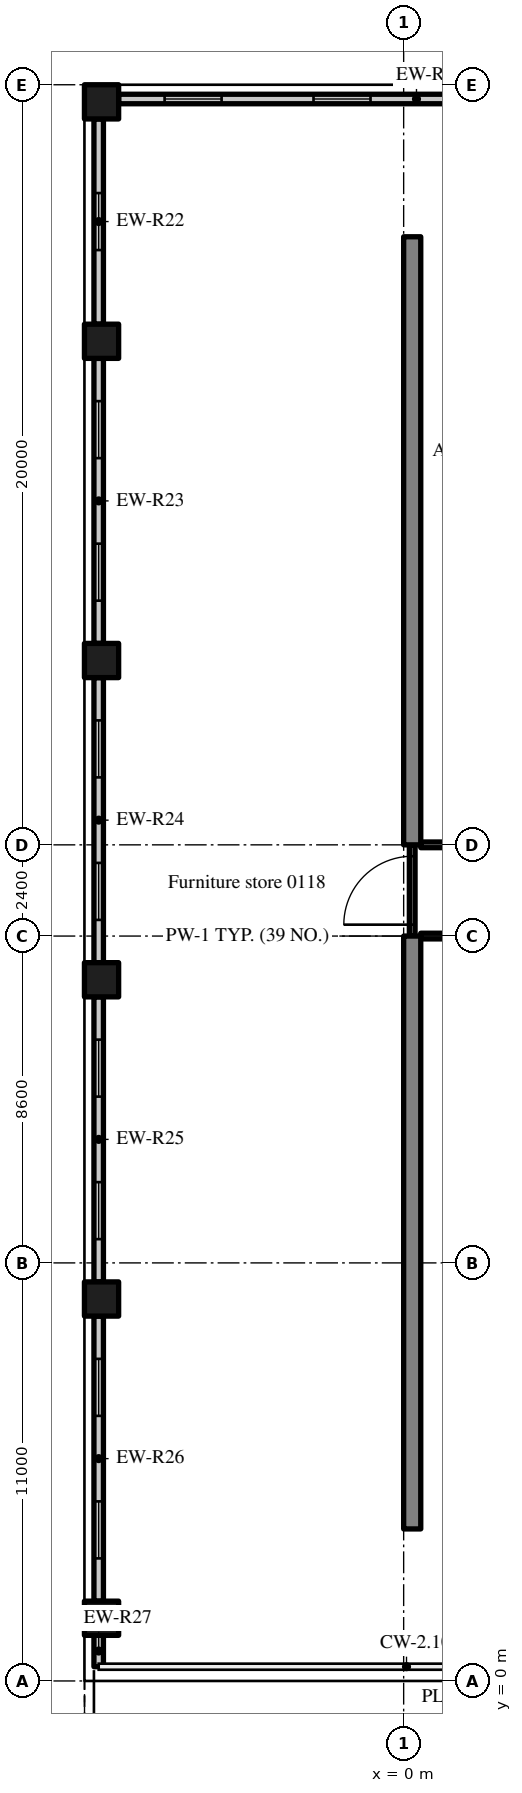
"""IFC4 building model, lengths in metres.
Left out: names, types, materials, properties, quantities, classifications, styles, units other than length and angle.
Written with IfcOpenShell. Run it as: python <this file> out.ifc"""

import sys

from ifc_helpers import new_model, si_unit, direction, frame, frame_2d, origin, origin_2d, place, context, subcontext, project, spatial, rectangle, extrude, source, transform, mapped, element, fill, save


model = new_model("IFC4")
c1 = context("Model", 3, precision=1e-05, world=origin(), true_north=direction((0.0, 1.0)))
c2 = subcontext(c1, "Body", "Model", "MODEL_VIEW")
j1 = project(units=[si_unit("LENGTHUNIT", "METRE"), si_unit("PLANEANGLEUNIT", "RADIAN")], contexts=[c1])
p1 = place(None, origin())
s1 = spatial("IfcSite", under=j1, at=p1, CompositionType="ELEMENT")
p2 = place(p1, origin())
s2 = spatial("IfcBuilding", under=s1, at=p2, CompositionType="ELEMENT")
p3 = place(p2, frame((0.0, 0.0, 6.0)))
s3 = spatial("IfcBuildingStorey", under=s2, at=p3, CompositionType="ELEMENT", Elevation=6.0)
m1 = source(origin(), c2, "Body", "SweptSolid", [
    extrude(rectangle(XDim=15.6, YDim=0.45, at=frame_2d((7.8, 0.0))), origin(), (0.0, 0.0, 1.0), 5.12),
])
p4 = place(p3, frame((0.225, 4.0, 0.0), z_axis=(0.0, 0.0, 1.0), x_axis=(0.0, 1.0, 0.0)))
e1 = element("IfcWall", 1, at=p4, inside=s3, PredefinedType="SHEAR", context=c2, shape_type="MappedRepresentation", body=[
    mapped(m1, transform((0.0, 0.0, 0.0), scale=1.0)),
])
m2 = source(origin(), c2, "Body", "SweptSolid", [
    extrude(rectangle(XDim=16.0, YDim=0.45, at=frame_2d((8.0, 0.0))), origin(), (0.0, 0.0, 1.0), 5.12),
])
p5 = place(p3, frame((0.225, 22.0, 0.0), z_axis=(0.0, 0.0, 1.0), x_axis=(0.0, 1.0, 0.0)))
e2 = element("IfcWall", 2, at=p5, inside=s3, PredefinedType="SHEAR", context=c2, shape_type="MappedRepresentation", body=[
    mapped(m2, transform((0.0, 0.0, 0.0), scale=1.0)),
])
m3 = source(origin(), c2, "Body", "SweptSolid", [
    extrude(rectangle(XDim=0.9, YDim=0.9, at=origin_2d()), origin(), (0.0, 0.0, 1.0), 5.12),
])
for number, where, z_axis, x_axis in (
    (3, (-7.95, 1.65, 0.0), (0.0, 0.0, 1.0), (1.0, 0.0, 0.0)),
    (4, (-7.95, 10.05, 0.0), (0.0, 0.0, 1.0), (1.0, 0.0, 0.0)),
    (5, (-7.95, 18.45, 0.0), (0.0, 0.0, 1.0), (1.0, 0.0, 0.0)),
    (6, (-7.95, 26.85, 0.0), (0.0, 0.0, 1.0), (1.0, 0.0, 0.0)),
    (7, (-7.95, 35.25, 0.0), (0.0, 0.0, 1.0), (1.0, 0.0, 0.0)),
    (8, (-7.95, 41.55, 0.0), (0.0, 0.0, 1.0), (1.0, 0.0, 0.0)),
):
    element("IfcColumn", number, at=place(p3, frame(where, z_axis=z_axis, x_axis=x_axis)), inside=s3, PredefinedType="COLUMN", context=c2, shape_type="MappedRepresentation", body=[
        mapped(m3, transform((0.0, 0.0, 0.0), scale=1.0)),
    ])
m4 = source(origin(), c2, "Body", "SweptSolid", [
    extrude(rectangle(XDim=15.675, YDim=0.25, at=frame_2d((7.837, 0.0))), origin(), (0.0, 0.0, 1.0), 4.37),
])
p6 = place(p3, frame((8.175, 41.625, 0.0), z_axis=(0.0, 0.0, 1.0), x_axis=(-1.0, 0.0, 0.0)))
e9 = element("IfcWall", 9, at=p6, inside=s3, PredefinedType="SOLIDWALL", context=c2, shape_type="MappedRepresentation", body=[
    mapped(m4, transform((0.0, 0.0, 0.0), scale=1.0)),
])
m5 = source(origin(), c2, "Body", "SweptSolid", [
    extrude(rectangle(XDim=1.5, YDim=1.5, at=frame_2d((0.75, 0.75))), frame((0.0, 0.135, 0.0), z_axis=(0.0, -1.0, 0.0), x_axis=(1.0, 0.0, 0.0)), (0.0, 0.0, 1.0), 0.27),
])
p7 = place(p6, frame((1.209, 0.0, 0.9)))
e10 = element("IfcOpeningElement", 10, at=p7, cuts=e9, PredefinedType="OPENING", context=c2, shape_type="MappedRepresentation", body=[
    mapped(m5, transform((0.0, 0.0, 0.0), scale=1.0)),
])
p8 = place(p6, frame((5.128, 0.0, 0.9)))
e11 = element("IfcOpeningElement", 11, at=p8, cuts=e9, PredefinedType="OPENING", context=c2, shape_type="MappedRepresentation", body=[
    mapped(m5, transform((0.0, 0.0, 0.0), scale=1.0)),
])
p9 = place(p6, frame((9.047, 0.0, 0.9)))
e12 = element("IfcOpeningElement", 12, at=p9, cuts=e9, PredefinedType="OPENING", context=c2, shape_type="MappedRepresentation", body=[
    mapped(m5, transform((0.0, 0.0, 0.0), scale=1.0)),
])
p10 = place(p6, frame((12.966, 0.0, 0.9)))
e13 = element("IfcOpeningElement", 13, at=p10, cuts=e9, PredefinedType="OPENING", context=c2, shape_type="MappedRepresentation", body=[
    mapped(m5, transform((0.0, 0.0, 0.0), scale=1.0)),
])
m6 = source(origin(), c2, "Body", "SweptSolid", [
    extrude(rectangle(XDim=5.4, YDim=0.25, at=frame_2d((2.7, 0.0))), origin(), (0.0, 0.0, 1.0), 4.12),
])
p11 = place(p3, frame((-8.025, 41.1, 0.0), z_axis=(0.0, 0.0, 1.0), x_axis=(0.0, -1.0, 0.0)))
e14 = element("IfcWall", 14, at=p11, inside=s3, PredefinedType="SOLIDWALL", context=c2, shape_type="MappedRepresentation", body=[
    mapped(m6, transform((0.0, 0.0, 0.0), scale=1.0)),
])
m7 = source(origin(), c2, "Body", "SweptSolid", [
    extrude(rectangle(XDim=1.5, YDim=2.0, at=frame_2d((0.75, 1.0))), frame((0.0, 0.135, 0.0), z_axis=(0.0, -1.0, 0.0), x_axis=(1.0, 0.0, 0.0)), (0.0, 0.0, 1.0), 0.27),
])
p12 = place(p11, frame((1.95, 0.0, 0.9)))
e15 = element("IfcOpeningElement", 15, at=p12, cuts=e14, PredefinedType="OPENING", context=c2, shape_type="MappedRepresentation", body=[
    mapped(m7, transform((0.0, 0.0, 0.0), scale=1.0)),
])
m8 = source(origin(), c2, "Body", "SweptSolid", [
    extrude(rectangle(XDim=7.5, YDim=0.25, at=frame_2d((3.75, 0.0))), origin(), (0.0, 0.0, 1.0), 4.12),
])
p13 = place(p3, frame((-8.025, 34.8, 0.0), z_axis=(0.0, 0.0, 1.0), x_axis=(0.0, -1.0, 0.0)))
e16 = element("IfcWall", 16, at=p13, inside=s3, PredefinedType="SOLIDWALL", context=c2, shape_type="MappedRepresentation", body=[
    mapped(m8, transform((0.0, 0.0, 0.0), scale=1.0)),
])
p14 = place(p13, frame((1.125, 0.0, 0.9)))
e17 = element("IfcOpeningElement", 17, at=p14, cuts=e16, PredefinedType="OPENING", context=c2, shape_type="MappedRepresentation", body=[
    mapped(m7, transform((0.0, 0.0, 0.0), scale=1.0)),
])
p15 = place(p13, frame((4.875, 0.0, 0.9)))
e18 = element("IfcOpeningElement", 18, at=p15, cuts=e16, PredefinedType="OPENING", context=c2, shape_type="MappedRepresentation", body=[
    mapped(m7, transform((0.0, 0.0, 0.0), scale=1.0)),
])
p16 = place(p3, frame((-8.025, 26.4, 0.0), z_axis=(0.0, 0.0, 1.0), x_axis=(0.0, -1.0, 0.0)))
e19 = element("IfcWall", 19, at=p16, inside=s3, PredefinedType="SOLIDWALL", context=c2, shape_type="MappedRepresentation", body=[
    mapped(m8, transform((0.0, 0.0, 0.0), scale=1.0)),
])
p17 = place(p16, frame((1.125, 0.0, 0.9)))
e20 = element("IfcOpeningElement", 20, at=p17, cuts=e19, PredefinedType="OPENING", context=c2, shape_type="MappedRepresentation", body=[
    mapped(m7, transform((0.0, 0.0, 0.0), scale=1.0)),
])
p18 = place(p16, frame((4.875, 0.0, 0.9)))
e21 = element("IfcOpeningElement", 21, at=p18, cuts=e19, PredefinedType="OPENING", context=c2, shape_type="MappedRepresentation", body=[
    mapped(m7, transform((0.0, 0.0, 0.0), scale=1.0)),
])
p19 = place(p3, frame((-8.025, 18.0, 0.0), z_axis=(0.0, 0.0, 1.0), x_axis=(0.0, -1.0, 0.0)))
e22 = element("IfcWall", 22, at=p19, inside=s3, PredefinedType="SOLIDWALL", context=c2, shape_type="MappedRepresentation", body=[
    mapped(m8, transform((0.0, 0.0, 0.0), scale=1.0)),
])
p20 = place(p19, frame((1.125, 0.0, 0.9)))
e23 = element("IfcOpeningElement", 23, at=p20, cuts=e22, PredefinedType="OPENING", context=c2, shape_type="MappedRepresentation", body=[
    mapped(m7, transform((0.0, 0.0, 0.0), scale=1.0)),
])
p21 = place(p19, frame((4.875, 0.0, 0.9)))
e24 = element("IfcOpeningElement", 24, at=p21, cuts=e22, PredefinedType="OPENING", context=c2, shape_type="MappedRepresentation", body=[
    mapped(m7, transform((0.0, 0.0, 0.0), scale=1.0)),
])
p22 = place(p3, frame((-8.025, 9.6, 0.0), z_axis=(0.0, 0.0, 1.0), x_axis=(0.0, -1.0, 0.0)))
e25 = element("IfcWall", 25, at=p22, inside=s3, PredefinedType="SOLIDWALL", context=c2, shape_type="MappedRepresentation", body=[
    mapped(m8, transform((0.0, 0.0, 0.0), scale=1.0)),
])
p23 = place(p22, frame((1.125, 0.0, 0.9)))
e26 = element("IfcOpeningElement", 26, at=p23, cuts=e25, PredefinedType="OPENING", context=c2, shape_type="MappedRepresentation", body=[
    mapped(m7, transform((0.0, 0.0, 0.0), scale=1.0)),
])
p24 = place(p22, frame((4.875, 0.0, 0.9)))
e27 = element("IfcOpeningElement", 27, at=p24, cuts=e25, PredefinedType="OPENING", context=c2, shape_type="MappedRepresentation", body=[
    mapped(m7, transform((0.0, 0.0, 0.0), scale=1.0)),
])
m9 = source(origin(), c2, "Body", "SweptSolid", [
    extrude(rectangle(XDim=0.825, YDim=0.25, at=frame_2d((0.413, 0.0))), origin(), (0.0, 0.0, 1.0), 4.12),
])
p25 = place(p3, frame((-8.025, 1.2, 0.0), z_axis=(0.0, 0.0, 1.0), x_axis=(0.0, -1.0, 0.0)))
e28 = element("IfcWall", 28, at=p25, inside=s3, PredefinedType="SOLIDWALL", context=c2, shape_type="MappedRepresentation", body=[
    mapped(m9, transform((0.0, 0.0, 0.0), scale=1.0)),
])
m10 = source(origin(), c2, "Body", "SweptSolid", [
    extrude(rectangle(XDim=3.675, YDim=0.15, at=frame_2d((1.837, 0.0))), origin(), (0.0, 0.0, 1.0), 4.42),
])
p26 = place(p3, frame((0.45, 19.6, 0.0), z_axis=(0.0, 0.0, 1.0), x_axis=(1.0, 0.0, 0.0)))
e29 = element("IfcWall", 29, at=p26, inside=s3, PredefinedType="PARTITIONING", context=c2, shape_type="MappedRepresentation", body=[
    mapped(m10, transform((0.0, 0.0, 0.0), scale=1.0)),
])
m11 = source(origin(), c2, "Body", "SweptSolid", [
    extrude(rectangle(XDim=1.0, YDim=2.1, at=frame_2d((0.5, 1.05))), frame((0.0, 0.085, 0.0), z_axis=(0.0, -1.0, 0.0), x_axis=(1.0, 0.0, 0.0)), (0.0, 0.0, 1.0), 0.17),
])
p27 = place(p26, frame((1.338, 0.0, 0.0)))
e30 = element("IfcOpeningElement", 30, at=p27, cuts=e29, PredefinedType="OPENING", context=c2, shape_type="MappedRepresentation", body=[
    mapped(m11, transform((0.0, 0.0, 0.0), scale=1.0)),
])
m12 = source(origin(), c2, "Body", "SweptSolid", [
    extrude(rectangle(XDim=2.4, YDim=0.15, at=frame_2d((1.2, 0.0))), origin(), (0.0, 0.0, 1.0), 4.22),
])
p28 = place(p3, frame((0.225, 19.6, 0.0), z_axis=(0.0, 0.0, 1.0), x_axis=(0.0, 1.0, 0.0)))
e31 = element("IfcWall", 31, at=p28, inside=s3, PredefinedType="PARTITIONING", context=c2, shape_type="MappedRepresentation", body=[
    mapped(m12, transform((0.0, 0.0, 0.0), scale=1.0)),
])
m13 = source(origin(), c2, "Body", "SweptSolid", [
    extrude(rectangle(XDim=1.8, YDim=2.1, at=frame_2d((0.9, 1.05))), frame((0.0, 0.085, 0.0), z_axis=(0.0, -1.0, 0.0), x_axis=(1.0, 0.0, 0.0)), (0.0, 0.0, 1.0), 0.17),
])
p29 = place(p28, frame((0.3, 0.0, 0.0)))
e32 = element("IfcOpeningElement", 32, at=p29, cuts=e31, PredefinedType="OPENING", context=c2, shape_type="MappedRepresentation", body=[
    mapped(m13, transform((0.0, 0.0, 0.0), scale=1.0)),
])
p30 = place(p3, frame((0.45, 22.0, 0.0), z_axis=(0.0, 0.0, 1.0), x_axis=(1.0, 0.0, 0.0)))
e33 = element("IfcWall", 33, at=p30, inside=s3, PredefinedType="PARTITIONING", context=c2, shape_type="MappedRepresentation", body=[
    mapped(m10, transform((0.0, 0.0, 0.0), scale=1.0)),
])
p31 = place(p30, frame((1.338, 0.0, 0.0)))
e34 = element("IfcOpeningElement", 34, at=p31, cuts=e33, PredefinedType="OPENING", context=c2, shape_type="MappedRepresentation", body=[
    mapped(m11, transform((0.0, 0.0, 0.0), scale=1.0)),
])
m14 = source(origin(), c2, "Body", "SweptSolid", [
    extrude(rectangle(XDim=1.5, YDim=1.5, at=frame_2d((0.75, 0.75))), frame((0.0, 0.03, 0.0), z_axis=(0.0, -1.0, 0.0), x_axis=(1.0, 0.0, 0.0)), (0.0, 0.0, 1.0), 0.06),
])
p32 = place(p9, origin())
e35 = element("IfcWindow", 35, at=p32, inside=s3, PartitioningType="SINGLE_PANEL", PredefinedType="WINDOW", context=c2, shape_type="MappedRepresentation", body=[
    mapped(m14, transform((0.0, 0.0, 0.0), scale=1.0)),
])
fill(e12, e35)
p33 = place(p10, origin())
e36 = element("IfcWindow", 36, at=p33, inside=s3, PartitioningType="SINGLE_PANEL", PredefinedType="WINDOW", context=c2, shape_type="MappedRepresentation", body=[
    mapped(m14, transform((0.0, 0.0, 0.0), scale=1.0)),
])
fill(e13, e36)
m15 = source(origin(), c2, "Body", "SweptSolid", [
    extrude(rectangle(XDim=1.5, YDim=2.0, at=frame_2d((0.75, 1.0))), frame((0.0, 0.03, 0.0), z_axis=(0.0, -1.0, 0.0), x_axis=(1.0, 0.0, 0.0)), (0.0, 0.0, 1.0), 0.06),
])
p34 = place(p12, origin())
e37 = element("IfcWindow", 37, at=p34, inside=s3, PartitioningType="SINGLE_PANEL", PredefinedType="WINDOW", context=c2, shape_type="MappedRepresentation", body=[
    mapped(m15, transform((0.0, 0.0, 0.0), scale=1.0)),
])
fill(e15, e37)
p35 = place(p14, origin())
e38 = element("IfcWindow", 38, at=p35, inside=s3, PartitioningType="SINGLE_PANEL", PredefinedType="WINDOW", context=c2, shape_type="MappedRepresentation", body=[
    mapped(m15, transform((0.0, 0.0, 0.0), scale=1.0)),
])
fill(e17, e38)
p36 = place(p15, origin())
e39 = element("IfcWindow", 39, at=p36, inside=s3, PartitioningType="SINGLE_PANEL", PredefinedType="WINDOW", context=c2, shape_type="MappedRepresentation", body=[
    mapped(m15, transform((0.0, 0.0, 0.0), scale=1.0)),
])
fill(e18, e39)
p37 = place(p17, origin())
e40 = element("IfcWindow", 40, at=p37, inside=s3, PartitioningType="SINGLE_PANEL", PredefinedType="WINDOW", context=c2, shape_type="MappedRepresentation", body=[
    mapped(m15, transform((0.0, 0.0, 0.0), scale=1.0)),
])
fill(e20, e40)
p38 = place(p18, origin())
e41 = element("IfcWindow", 41, at=p38, inside=s3, PartitioningType="SINGLE_PANEL", PredefinedType="WINDOW", context=c2, shape_type="MappedRepresentation", body=[
    mapped(m15, transform((0.0, 0.0, 0.0), scale=1.0)),
])
fill(e21, e41)
p39 = place(p20, origin())
e42 = element("IfcWindow", 42, at=p39, inside=s3, PartitioningType="SINGLE_PANEL", PredefinedType="WINDOW", context=c2, shape_type="MappedRepresentation", body=[
    mapped(m15, transform((0.0, 0.0, 0.0), scale=1.0)),
])
fill(e23, e42)
p40 = place(p21, origin())
e43 = element("IfcWindow", 43, at=p40, inside=s3, PartitioningType="SINGLE_PANEL", PredefinedType="WINDOW", context=c2, shape_type="MappedRepresentation", body=[
    mapped(m15, transform((0.0, 0.0, 0.0), scale=1.0)),
])
fill(e24, e43)
p41 = place(p23, origin())
e44 = element("IfcWindow", 44, at=p41, inside=s3, PartitioningType="SINGLE_PANEL", PredefinedType="WINDOW", context=c2, shape_type="MappedRepresentation", body=[
    mapped(m15, transform((0.0, 0.0, 0.0), scale=1.0)),
])
fill(e26, e44)
p42 = place(p24, origin())
e45 = element("IfcWindow", 45, at=p42, inside=s3, PartitioningType="SINGLE_PANEL", PredefinedType="WINDOW", context=c2, shape_type="MappedRepresentation", body=[
    mapped(m15, transform((0.0, 0.0, 0.0), scale=1.0)),
])
fill(e27, e45)
m16 = source(origin(), c2, "Body", "SweptSolid", [
    extrude(rectangle(XDim=1.8, YDim=2.1, at=frame_2d((0.9, 1.05))), frame((0.0, 0.025, 0.0), z_axis=(0.0, -1.0, 0.0), x_axis=(1.0, 0.0, 0.0)), (0.0, 0.0, 1.0), 0.05),
])
p43 = place(p29, origin())
e46 = element("IfcDoor", 46, at=p43, inside=s3, OperationType="DOUBLE_DOOR_SINGLE_SWING", PredefinedType="DOOR", context=c2, shape_type="MappedRepresentation", body=[
    mapped(m16, transform((0.0, 0.0, 0.0), scale=1.0)),
])
fill(e32, e46)
save(model, sys.argv[1])
